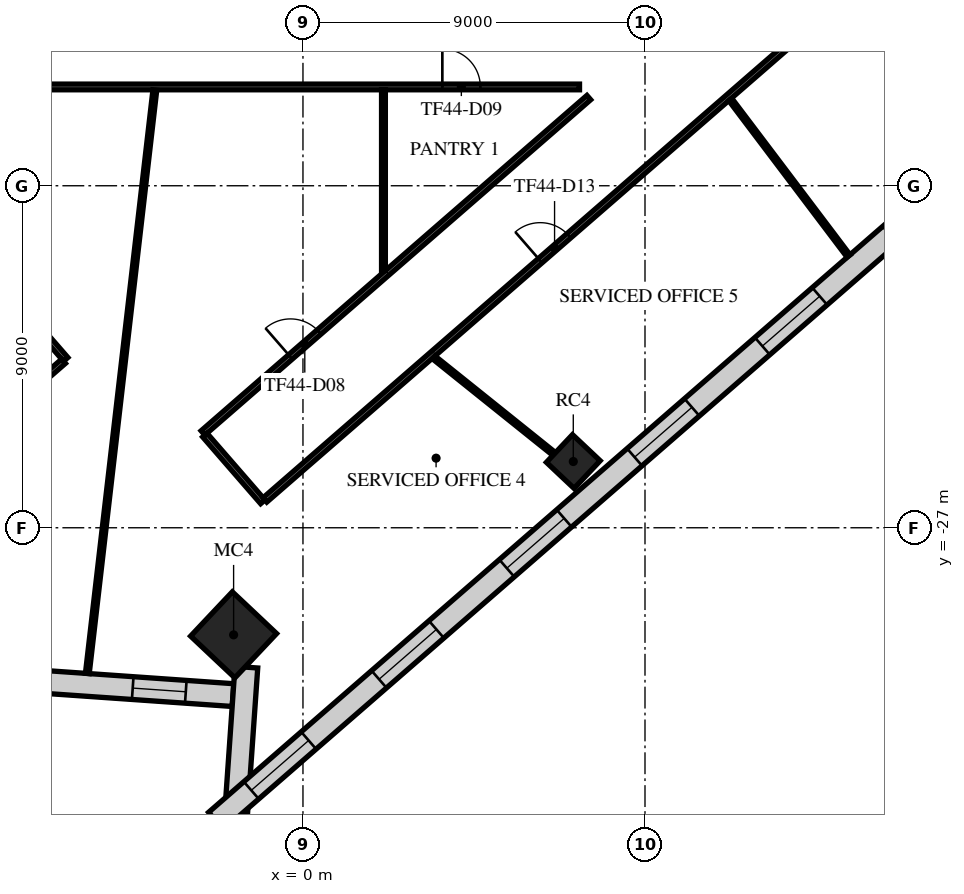
"""IFC4 building model, lengths in metres.
Left out: names, types, materials, properties, quantities, classifications, styles, units other than length and angle.
Written with IfcOpenShell. Run it as: python <this file> out.ifc"""

import sys

from ifc_helpers import new_model, si_unit, direction, frame, frame_2d, origin, origin_2d, place, context, subcontext, project, spatial, rectangle, extrude, element, fill, save


model = new_model("IFC4")
c1 = context("Model", 3, precision=1e-05, world=origin(), true_north=direction((0.0, 1.0)))
c2 = subcontext(c1, "Body", "Model", "MODEL_VIEW")
j1 = project(units=[si_unit("LENGTHUNIT", "METRE"), si_unit("PLANEANGLEUNIT", "RADIAN")], contexts=[c1])
p1 = place(None, origin())
s1 = spatial("IfcSite", under=j1, at=p1, CompositionType="ELEMENT")
p2 = place(p1, origin())
s2 = spatial("IfcBuilding", under=s1, at=p2, CompositionType="ELEMENT")
p3 = place(p2, frame((0.0, 0.0, 189.3)))
s3 = spatial("IfcBuildingStorey", under=s2, at=p3, CompositionType="ELEMENT", Elevation=189.3)
p4 = place(p3, frame((-1.825, -29.818, -0.38), z_axis=(0.0, 0.0, 1.0), x_axis=(0.685916152371, 0.727680583715, 0.0)))
e1 = element("IfcColumn", 1, at=p4, inside=s3, PredefinedType="COLUMN", context=c2, shape_type="SweptSolid", body=[
    extrude(rectangle(XDim=1.6, YDim=1.6, at=origin_2d()), origin(), (0.0, 0.0, 1.0), 4.38),
])
p5 = place(p3, frame((7.113, -25.257, -0.38), z_axis=(0.0, 0.0, 1.0), x_axis=(0.685916152371, 0.727680583715, 0.0)))
e2 = element("IfcColumn", 2, at=p5, inside=s3, PredefinedType="COLUMN", context=c2, shape_type="SweptSolid", body=[
    extrude(rectangle(XDim=1.0, YDim=1.0, at=origin_2d()), origin(), (0.0, 0.0, 1.0), 4.38),
])
p6 = place(p3, frame((-9.601, -30.861, 0.0), z_axis=(0.0, 0.0, 1.0), x_axis=(0.997564801601, -0.069745728239, 0.0)))
e3 = element("IfcWall", 3, at=p6, inside=s3, PredefinedType="STANDARD", context=c2, shape_type="SweptSolid", body=[
    extrude(rectangle(XDim=7.778, YDim=0.6, at=frame_2d((3.889, 0.0))), origin(), (0.0, 0.0, 1.0), 3.62),
])
p7 = place(p6, frame((1.244, 0.0, 0.9)))
e4 = element("IfcOpeningElement", 4, at=p7, cuts=e3, PredefinedType="OPENING", context=c2, shape_type="SweptSolid", body=[
    extrude(rectangle(XDim=1.4, YDim=2.1, at=frame_2d((0.7, 1.05))), frame((0.0, 0.31, 0.0), z_axis=(0.0, -1.0, 0.0), x_axis=(1.0, 0.0, 0.0)), (0.0, 0.0, 1.0), 0.62),
])
p8 = place(p6, frame((5.134, 0.0, 0.9)))
e5 = element("IfcOpeningElement", 5, at=p8, cuts=e3, PredefinedType="OPENING", context=c2, shape_type="SweptSolid", body=[
    extrude(rectangle(XDim=1.4, YDim=2.1, at=frame_2d((0.7, 1.05))), frame((0.0, 0.31, 0.0), z_axis=(0.0, -1.0, 0.0), x_axis=(1.0, 0.0, 0.0)), (0.0, 0.0, 1.0), 0.62),
])
p9 = place(p3, frame((-1.49, -30.669, 0.0), z_axis=(0.0, 0.0, 1.0), x_axis=(-0.069722992179, -0.997566390954, 0.0)))
e6 = element("IfcWall", 6, at=p9, inside=s3, PredefinedType="STANDARD", context=c2, shape_type="SweptSolid", body=[
    extrude(rectangle(XDim=4.303, YDim=0.6, at=frame_2d((2.152, 0.0))), origin(), (0.0, 0.0, 1.0), 3.62),
])
p10 = place(p3, frame((-2.286, -34.715, 0.0), z_axis=(0.0, 0.0, 1.0), x_axis=(0.754708272811, 0.656060532993, 0.0)))
e7 = element("IfcWall", 7, at=p10, inside=s3, PredefinedType="STANDARD", context=c2, shape_type="SweptSolid", body=[
    extrude(rectangle(XDim=49.0, YDim=0.6, at=frame_2d((24.5, 0.0))), origin(), (0.0, 0.0, 1.0), 3.62),
])
p11 = place(p10, frame((1.227, 0.0, 0.9)))
e8 = element("IfcOpeningElement", 8, at=p11, cuts=e7, PredefinedType="OPENING", context=c2, shape_type="SweptSolid", body=[
    extrude(rectangle(XDim=2.0, YDim=2.1, at=frame_2d((1.0, 1.05))), frame((0.0, 0.31, 0.0), z_axis=(0.0, -1.0, 0.0), x_axis=(1.0, 0.0, 0.0)), (0.0, 0.0, 1.0), 0.62),
])
p12 = place(p10, frame((5.682, 0.0, 0.9)))
e9 = element("IfcOpeningElement", 9, at=p12, cuts=e7, PredefinedType="OPENING", context=c2, shape_type="SweptSolid", body=[
    extrude(rectangle(XDim=2.0, YDim=2.1, at=frame_2d((1.0, 1.05))), frame((0.0, 0.31, 0.0), z_axis=(0.0, -1.0, 0.0), x_axis=(1.0, 0.0, 0.0)), (0.0, 0.0, 1.0), 0.62),
])
p13 = place(p10, frame((10.136, 0.0, 0.9)))
e10 = element("IfcOpeningElement", 10, at=p13, cuts=e7, PredefinedType="OPENING", context=c2, shape_type="SweptSolid", body=[
    extrude(rectangle(XDim=2.0, YDim=2.1, at=frame_2d((1.0, 1.05))), frame((0.0, 0.31, 0.0), z_axis=(0.0, -1.0, 0.0), x_axis=(1.0, 0.0, 0.0)), (0.0, 0.0, 1.0), 0.62),
])
p14 = place(p10, frame((14.591, 0.0, 0.9)))
e11 = element("IfcOpeningElement", 11, at=p14, cuts=e7, PredefinedType="OPENING", context=c2, shape_type="SweptSolid", body=[
    extrude(rectangle(XDim=2.0, YDim=2.1, at=frame_2d((1.0, 1.05))), frame((0.0, 0.31, 0.0), z_axis=(0.0, -1.0, 0.0), x_axis=(1.0, 0.0, 0.0)), (0.0, 0.0, 1.0), 0.62),
])
p15 = place(p10, frame((19.045, 0.0, 0.9)))
e12 = element("IfcOpeningElement", 12, at=p15, cuts=e7, PredefinedType="OPENING", context=c2, shape_type="SweptSolid", body=[
    extrude(rectangle(XDim=2.0, YDim=2.1, at=frame_2d((1.0, 1.05))), frame((0.0, 0.31, 0.0), z_axis=(0.0, -1.0, 0.0), x_axis=(1.0, 0.0, 0.0)), (0.0, 0.0, 1.0), 0.62),
])
p16 = place(p10, frame((23.5, 0.0, 0.9)))
e13 = element("IfcOpeningElement", 13, at=p16, cuts=e7, PredefinedType="OPENING", context=c2, shape_type="SweptSolid", body=[
    extrude(rectangle(XDim=2.0, YDim=2.1, at=frame_2d((1.0, 1.05))), frame((0.0, 0.31, 0.0), z_axis=(0.0, -1.0, 0.0), x_axis=(1.0, 0.0, 0.0)), (0.0, 0.0, 1.0), 0.62),
])
p17 = place(p10, frame((27.955, 0.0, 0.9)))
e14 = element("IfcOpeningElement", 14, at=p17, cuts=e7, PredefinedType="OPENING", context=c2, shape_type="SweptSolid", body=[
    extrude(rectangle(XDim=2.0, YDim=2.1, at=frame_2d((1.0, 1.05))), frame((0.0, 0.31, 0.0), z_axis=(0.0, -1.0, 0.0), x_axis=(1.0, 0.0, 0.0)), (0.0, 0.0, 1.0), 0.62),
])
p18 = place(p10, frame((32.409, 0.0, 0.9)))
e15 = element("IfcOpeningElement", 15, at=p18, cuts=e7, PredefinedType="OPENING", context=c2, shape_type="SweptSolid", body=[
    extrude(rectangle(XDim=2.0, YDim=2.1, at=frame_2d((1.0, 1.05))), frame((0.0, 0.31, 0.0), z_axis=(0.0, -1.0, 0.0), x_axis=(1.0, 0.0, 0.0)), (0.0, 0.0, 1.0), 0.62),
])
p19 = place(p10, frame((36.864, 0.0, 0.9)))
e16 = element("IfcOpeningElement", 16, at=p19, cuts=e7, PredefinedType="OPENING", context=c2, shape_type="SweptSolid", body=[
    extrude(rectangle(XDim=2.0, YDim=2.1, at=frame_2d((1.0, 1.05))), frame((0.0, 0.31, 0.0), z_axis=(0.0, -1.0, 0.0), x_axis=(1.0, 0.0, 0.0)), (0.0, 0.0, 1.0), 0.62),
])
p20 = place(p10, frame((41.318, 0.0, 0.9)))
e17 = element("IfcOpeningElement", 17, at=p20, cuts=e7, PredefinedType="OPENING", context=c2, shape_type="SweptSolid", body=[
    extrude(rectangle(XDim=2.0, YDim=2.1, at=frame_2d((1.0, 1.05))), frame((0.0, 0.31, 0.0), z_axis=(0.0, -1.0, 0.0), x_axis=(1.0, 0.0, 0.0)), (0.0, 0.0, 1.0), 0.62),
])
p21 = place(p10, frame((45.773, 0.0, 0.9)))
e18 = element("IfcOpeningElement", 18, at=p21, cuts=e7, PredefinedType="OPENING", context=c2, shape_type="SweptSolid", body=[
    extrude(rectangle(XDim=2.0, YDim=2.1, at=frame_2d((1.0, 1.05))), frame((0.0, 0.31, 0.0), z_axis=(0.0, -1.0, 0.0), x_axis=(1.0, 0.0, 0.0)), (0.0, 0.0, 1.0), 0.62),
])
p22 = place(p3, frame((-11.705, -16.285, 0.0), z_axis=(0.0, 0.0, 1.0), x_axis=(0.656018266208, -0.754745012837, 0.0)))
e19 = element("IfcWall", 19, at=p22, inside=s3, PredefinedType="PARTITIONING", context=c2, shape_type="SweptSolid", body=[
    extrude(rectangle(XDim=8.326, YDim=0.15, at=frame_2d((4.163, 0.0))), origin(), (0.0, 0.0, 1.0), 3.17),
])
p23 = place(p3, frame((-10.486, -15.4, 0.0), z_axis=(0.0, 0.0, 1.0), x_axis=(1.0, 0.0, 0.0)))
e20 = element("IfcWall", 20, at=p23, inside=s3, PredefinedType="PARTITIONING", context=c2, shape_type="SweptSolid", body=[
    extrude(rectangle(XDim=17.763, YDim=0.15, at=frame_2d((8.882, 0.0))), origin(), (0.0, 0.0, 1.0), 3.17),
])
p24 = place(p23, frame((14.154, 0.0, 0.0)))
e21 = element("IfcOpeningElement", 21, at=p24, cuts=e20, PredefinedType="OPENING", context=c2, shape_type="SweptSolid", body=[
    extrude(rectangle(XDim=1.0, YDim=2.1, at=frame_2d((0.5, 1.05))), frame((0.0, 0.085, 0.0), z_axis=(0.0, -1.0, 0.0), x_axis=(1.0, 0.0, 0.0)), (0.0, 0.0, 1.0), 0.17),
])
p25 = place(p3, frame((-7.997, -24.095, 0.0), z_axis=(0.0, 0.0, 1.0), x_axis=(0.754549456123, 0.656243185308, 0.0)))
e22 = element("IfcWall", 22, at=p25, inside=s3, PredefinedType="PARTITIONING", context=c2, shape_type="SweptSolid", body=[
    extrude(rectangle(XDim=2.25, YDim=0.15, at=frame_2d((1.125, 0.0))), origin(), (0.0, 0.0, 1.0), 3.17),
])
p26 = place(p3, frame((-2.631, -24.505, 0.0), z_axis=(0.0, 0.0, 1.0), x_axis=(0.754714526528, 0.656053338874, 0.0)))
e23 = element("IfcWall", 23, at=p26, inside=s3, PredefinedType="PARTITIONING", context=c2, shape_type="SweptSolid", body=[
    extrude(rectangle(XDim=13.452, YDim=0.15, at=frame_2d((6.726, 0.0))), origin(), (0.0, 0.0, 1.0), 3.17),
])
p27 = place(p26, frame((3.05, 0.0, 0.0)))
e24 = element("IfcOpeningElement", 24, at=p27, cuts=e23, PredefinedType="OPENING", context=c2, shape_type="SweptSolid", body=[
    extrude(rectangle(XDim=1.0, YDim=2.1, at=frame_2d((0.5, 1.05))), frame((0.0, 0.085, 0.0), z_axis=(0.0, -1.0, 0.0), x_axis=(1.0, 0.0, 0.0)), (0.0, 0.0, 1.0), 0.17),
])
p28 = place(p3, frame((-2.582, -24.562, 0.0), z_axis=(0.0, 0.0, 1.0), x_axis=(0.655809509093, -0.754926412164, 0.0)))
e25 = element("IfcWall", 25, at=p28, inside=s3, PredefinedType="PARTITIONING", context=c2, shape_type="SweptSolid", body=[
    extrude(rectangle(XDim=2.325, YDim=0.15, at=frame_2d((1.163, 0.0))), origin(), (0.0, 0.0, 1.0), 3.17),
])
p29 = place(p3, frame((-1.0, -26.268, 0.0), z_axis=(0.0, 0.0, 1.0), x_axis=(0.754711356604, 0.656056985492, 0.0)))
e26 = element("IfcWall", 26, at=p29, inside=s3, PredefinedType="PARTITIONING", context=c2, shape_type="SweptSolid", body=[
    extrude(rectangle(XDim=36.052, YDim=0.15, at=frame_2d((18.026, 0.0))), origin(), (0.0, 0.0, 1.0), 3.17),
])
p30 = place(p29, frame((9.598, 0.0, 0.0)))
e27 = element("IfcOpeningElement", 27, at=p30, cuts=e26, PredefinedType="OPENING", context=c2, shape_type="SweptSolid", body=[
    extrude(rectangle(XDim=1.0, YDim=2.1, at=frame_2d((0.5, 1.05))), frame((0.0, 0.085, 0.0), z_axis=(0.0, -1.0, 0.0), x_axis=(1.0, 0.0, 0.0)), (0.0, 0.0, 1.0), 0.17),
])
p31 = place(p29, frame((20.957, 0.0, 0.0)))
e28 = element("IfcOpeningElement", 28, at=p31, cuts=e26, PredefinedType="OPENING", context=c2, shape_type="SweptSolid", body=[
    extrude(rectangle(XDim=1.0, YDim=2.1, at=frame_2d((0.5, 1.05))), frame((0.0, 0.085, 0.0), z_axis=(0.0, -1.0, 0.0), x_axis=(1.0, 0.0, 0.0)), (0.0, 0.0, 1.0), 0.17),
])
p32 = place(p29, frame((27.87, 0.0, 0.0)))
e29 = element("IfcOpeningElement", 29, at=p32, cuts=e26, PredefinedType="OPENING", context=c2, shape_type="SweptSolid", body=[
    extrude(rectangle(XDim=1.8, YDim=2.1, at=frame_2d((0.9, 1.05))), frame((0.0, 0.085, 0.0), z_axis=(0.0, -1.0, 0.0), x_axis=(1.0, 0.0, 0.0)), (0.0, 0.0, 1.0), 0.17),
])
p33 = place(p3, frame((-5.674, -30.833, 0.0), z_axis=(0.0, 0.0, 1.0), x_axis=(0.114957483757, 0.993370412751, 0.0)))
e30 = element("IfcWall", 30, at=p33, inside=s3, PredefinedType="PARTITIONING", context=c2, shape_type="SweptSolid", body=[
    extrude(rectangle(XDim=15.455, YDim=0.1, at=frame_2d((7.727, 0.0))), origin(), (0.0, 0.0, 1.0), 3.62),
])
p34 = place(p3, frame((2.118, -20.234, 0.0), z_axis=(0.0, 0.0, 1.0), x_axis=(0.0, 1.0, 0.0)))
e31 = element("IfcWall", 31, at=p34, inside=s3, PredefinedType="PARTITIONING", context=c2, shape_type="SweptSolid", body=[
    extrude(rectangle(XDim=4.759, YDim=0.1, at=frame_2d((2.379, 0.0))), origin(), (0.0, 0.0, 1.0), 3.17),
])
p35 = place(p3, frame((3.441, -22.517, 0.0), z_axis=(0.0, 0.0, 1.0), x_axis=(0.780129784841, -0.62561770979, 0.0)))
e32 = element("IfcWall", 32, at=p35, inside=s3, PredefinedType="PARTITIONING", context=c2, shape_type="SweptSolid", body=[
    extrude(rectangle(XDim=4.064, YDim=0.1, at=frame_2d((2.032, 0.0))), origin(), (0.0, 0.0, 1.0), 3.17),
])
p36 = place(p3, frame((11.243, -15.729, 0.0), z_axis=(0.0, 0.0, 1.0), x_axis=(0.602848474471, -0.797855699251, 0.0)))
e33 = element("IfcWall", 33, at=p36, inside=s3, PredefinedType="PARTITIONING", context=c2, shape_type="SweptSolid", body=[
    extrude(rectangle(XDim=5.163, YDim=0.1, at=frame_2d((2.582, 0.0))), origin(), (0.0, 0.0, 1.0), 3.17),
])
p37 = place(p8, origin())
e34 = element("IfcWindow", 34, at=p37, inside=s3, PartitioningType="SINGLE_PANEL", PredefinedType="WINDOW", context=c2, shape_type="SweptSolid", body=[
    extrude(rectangle(XDim=1.4, YDim=2.1, at=frame_2d((0.7, 1.05))), frame((0.0, 0.03, 0.0), z_axis=(0.0, -1.0, 0.0), x_axis=(1.0, 0.0, 0.0)), (0.0, 0.0, 1.0), 0.06),
])
fill(e5, e34)
p38 = place(p11, origin())
e35 = element("IfcWindow", 35, at=p38, inside=s3, PartitioningType="SINGLE_PANEL", PredefinedType="WINDOW", context=c2, shape_type="SweptSolid", body=[
    extrude(rectangle(XDim=2.0, YDim=2.1, at=frame_2d((1.0, 1.05))), frame((0.0, 0.03, 0.0), z_axis=(0.0, -1.0, 0.0), x_axis=(1.0, 0.0, 0.0)), (0.0, 0.0, 1.0), 0.06),
])
fill(e8, e35)
p39 = place(p12, origin())
e36 = element("IfcWindow", 36, at=p39, inside=s3, PartitioningType="SINGLE_PANEL", PredefinedType="WINDOW", context=c2, shape_type="SweptSolid", body=[
    extrude(rectangle(XDim=2.0, YDim=2.1, at=frame_2d((1.0, 1.05))), frame((0.0, 0.03, 0.0), z_axis=(0.0, -1.0, 0.0), x_axis=(1.0, 0.0, 0.0)), (0.0, 0.0, 1.0), 0.06),
])
fill(e9, e36)
p40 = place(p13, origin())
e37 = element("IfcWindow", 37, at=p40, inside=s3, PartitioningType="SINGLE_PANEL", PredefinedType="WINDOW", context=c2, shape_type="SweptSolid", body=[
    extrude(rectangle(XDim=2.0, YDim=2.1, at=frame_2d((1.0, 1.05))), frame((0.0, 0.03, 0.0), z_axis=(0.0, -1.0, 0.0), x_axis=(1.0, 0.0, 0.0)), (0.0, 0.0, 1.0), 0.06),
])
fill(e10, e37)
p41 = place(p14, origin())
e38 = element("IfcWindow", 38, at=p41, inside=s3, PartitioningType="SINGLE_PANEL", PredefinedType="WINDOW", context=c2, shape_type="SweptSolid", body=[
    extrude(rectangle(XDim=2.0, YDim=2.1, at=frame_2d((1.0, 1.05))), frame((0.0, 0.03, 0.0), z_axis=(0.0, -1.0, 0.0), x_axis=(1.0, 0.0, 0.0)), (0.0, 0.0, 1.0), 0.06),
])
fill(e11, e38)
p42 = place(p15, origin())
e39 = element("IfcWindow", 39, at=p42, inside=s3, PartitioningType="SINGLE_PANEL", PredefinedType="WINDOW", context=c2, shape_type="SweptSolid", body=[
    extrude(rectangle(XDim=2.0, YDim=2.1, at=frame_2d((1.0, 1.05))), frame((0.0, 0.03, 0.0), z_axis=(0.0, -1.0, 0.0), x_axis=(1.0, 0.0, 0.0)), (0.0, 0.0, 1.0), 0.06),
])
fill(e12, e39)
p43 = place(p27, origin())
e40 = element("IfcDoor", 40, at=p43, inside=s3, OperationType="SINGLE_SWING_RIGHT", PredefinedType="DOOR", context=c2, shape_type="SweptSolid", body=[
    extrude(rectangle(XDim=1.0, YDim=2.1, at=frame_2d((0.5, 1.05))), frame((0.0, 0.025, 0.0), z_axis=(0.0, -1.0, 0.0), x_axis=(1.0, 0.0, 0.0)), (0.0, 0.0, 1.0), 0.05),
])
fill(e24, e40)
p44 = place(p24, frame((1.0, 0.0, 0.0), z_axis=(0.0, 0.0, 1.0), x_axis=(-1.0, 0.0, 0.0)))
e41 = element("IfcDoor", 41, at=p44, inside=s3, OperationType="SINGLE_SWING_LEFT", PredefinedType="DOOR", context=c2, shape_type="SweptSolid", body=[
    extrude(rectangle(XDim=1.0, YDim=2.1, at=frame_2d((0.5, 1.05))), frame((0.0, 0.025, 0.0), z_axis=(0.0, -1.0, 0.0), x_axis=(1.0, 0.0, 0.0)), (0.0, 0.0, 1.0), 0.05),
])
fill(e21, e41)
p45 = place(p30, frame((1.0, 0.0, 0.0), z_axis=(0.0, 0.0, 1.0), x_axis=(-1.0, 0.0, 0.0)))
e42 = element("IfcDoor", 42, at=p45, inside=s3, OperationType="SINGLE_SWING_LEFT", PredefinedType="DOOR", context=c2, shape_type="SweptSolid", body=[
    extrude(rectangle(XDim=1.0, YDim=2.1, at=frame_2d((0.5, 1.05))), frame((0.0, 0.025, 0.0), z_axis=(0.0, -1.0, 0.0), x_axis=(1.0, 0.0, 0.0)), (0.0, 0.0, 1.0), 0.05),
])
fill(e27, e42)
save(model, sys.argv[1])
